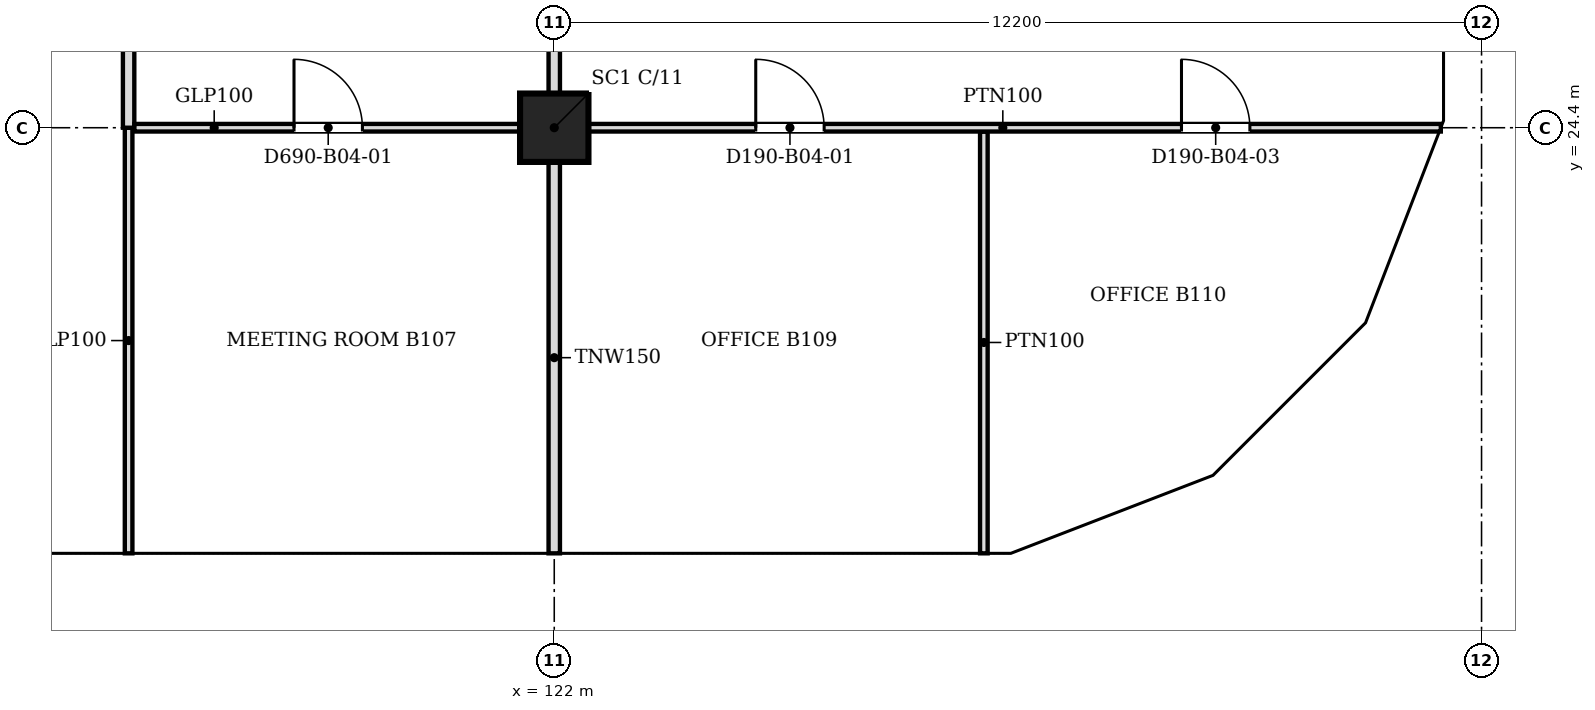
"""IFC4 building model, lengths in metres.
Left out: names, types, materials, properties, quantities, classifications, styles, units other than length and angle.
Written with IfcOpenShell. Run it as: python <this file> out.ifc"""

import sys

from ifc_helpers import new_model, si_unit, direction, frame, frame_2d, origin, origin_2d, place, context, subcontext, project, spatial, polyline, rectangle, outline, extrude, faceted_brep, source, transform, mapped, element, fill, save


model = new_model("IFC4")
c1 = context("Model", 3, precision=1e-05, world=origin(), true_north=direction((0.0, 1.0)))
c2 = subcontext(c1, "Body", "Model", "MODEL_VIEW")
j1 = project(units=[si_unit("LENGTHUNIT", "METRE"), si_unit("PLANEANGLEUNIT", "RADIAN")], contexts=[c1])
p1 = place(None, origin())
s1 = spatial("IfcSite", under=j1, at=p1, CompositionType="ELEMENT")
p2 = place(p1, origin())
s2 = spatial("IfcBuilding", under=s1, at=p2, CompositionType="ELEMENT")
p3 = place(p2, frame((0.0, 0.0, 37.2)))
s3 = spatial("IfcBuildingStorey", under=s2, at=p3, CompositionType="ELEMENT", Elevation=37.2)
p4 = place(p3, frame((122.0, 24.4, 0.0), z_axis=(0.0, 0.0, 1.0), x_axis=(1.0, 0.0, 0.0)))
e1 = element("IfcColumn", 1, at=p4, inside=s3, PredefinedType="COLUMN", context=c2, shape_type="SweptSolid", body=[
    extrude(rectangle(XDim=0.9, YDim=0.9, at=origin_2d()), origin(), (0.0, 0.0, 1.0), 3.6),
])
m1 = source(origin(), c2, "Body", "Brep", [
    faceted_brep([(3.05, -0.25, 0.0), (6.1, -0.25, 3.8), (6.1, -0.25, 3.8), (3.05, -0.25, 7.6), (0.0, -0.25, 3.8), (0.0, 0.25, 3.8), (3.05, 0.25, 7.6), (6.1, 0.25, 3.8), (6.1, 0.25, 3.8), (3.05, 0.25, 0.0)], [[[0, 1, 2, 3, 4]], [[5, 6, 7, 8, 9]], [[9, 8, 1, 0]], [[7, 6, 3, 2]], [[6, 5, 4, 3]], [[5, 9, 0, 4]], [[1, 8, 7, 2]]]),
])
p5 = place(p3, frame((109.8, 18.55, -3.8), z_axis=(0.0, 0.0, 1.0), x_axis=(1.0, 0.0, 0.0)))
e2 = element("IfcWall", 2, at=p5, inside=s3, PredefinedType="SOLIDWALL", context=c2, shape_type="MappedRepresentation", body=[
    mapped(m1, transform((0.0, 0.0, 0.0), scale=1.0)),
])
m2 = source(origin(), c2, "Body", "SweptSolid", [
    extrude(outline(polyline([(3.05, 0.399), (5.78, 3.8), (3.05, 7.201), (0.321, 3.8), (3.05, 0.399)])), frame((0.0, 0.26, 0.0), z_axis=(0.0, -1.0, 0.0), x_axis=(1.0, 0.0, 0.0)), (0.0, 0.0, 1.0), 0.52),
])
p6 = place(p5, origin())
e3 = element("IfcOpeningElement", 3, at=p6, cuts=e2, PredefinedType="OPENING", context=c2, shape_type="MappedRepresentation", body=[
    mapped(m2, transform((0.0, 0.0, 0.0), scale=1.0)),
])
m3 = source(origin(), c2, "Body", "SweptSolid", [
    extrude(outline(polyline([(3.05, 0.0), (6.1, 3.8), (3.05, 7.6), (0.0, 3.8), (3.05, 0.0)])), frame((0.0, 0.25, 0.0), z_axis=(0.0, -1.0, 0.0), x_axis=(1.0, 0.0, 0.0)), (0.0, 0.0, 1.0), 0.5),
])
p7 = place(p3, frame((115.9, 18.55, -3.8), z_axis=(0.0, 0.0, 1.0), x_axis=(1.0, 0.0, 0.0)))
e4 = element("IfcWall", 4, at=p7, inside=s3, PredefinedType="SOLIDWALL", context=c2, shape_type="MappedRepresentation", body=[
    mapped(m3, transform((0.0, 0.0, 0.0), scale=1.0)),
])
p8 = place(p7, origin())
e5 = element("IfcOpeningElement", 5, at=p8, cuts=e4, PredefinedType="OPENING", context=c2, shape_type="MappedRepresentation", body=[
    mapped(m2, transform((0.0, 0.0, 0.0), scale=1.0)),
])
m4 = source(origin(), c2, "Body", "Brep", [
    faceted_brep([(3.05, -0.25, 0.0), (6.053, -0.25, 3.8), (3.05, -0.25, 7.6), (0.0, -0.25, 3.8), (0.0, 0.25, 3.8), (3.05, 0.25, 7.6), (6.007, 0.25, 3.859), (6.007, 0.25, 3.741), (3.05, 0.25, 0.0), (6.053, 0.0, 3.8)], [[[0, 1, 2, 3]], [[4, 5, 6, 7, 8]], [[8, 7, 9, 1, 0]], [[6, 5, 2, 1, 9]], [[5, 4, 3, 2]], [[4, 8, 0, 3]], [[9, 7, 6]]]),
])
p9 = place(p3, frame((122.0, 18.55, -3.8), z_axis=(0.0, 0.0, 1.0), x_axis=(1.0, 0.0, 0.0)))
e6 = element("IfcWall", 6, at=p9, inside=s3, PredefinedType="SOLIDWALL", context=c2, shape_type="MappedRepresentation", body=[
    mapped(m4, transform((0.0, 0.0, 0.0), scale=1.0)),
])
m5 = source(origin(), c2, "Body", "SweptSolid", [
    extrude(outline(polyline([(3.049, 0.401), (5.735, 3.8), (3.049, 7.199), (0.321, 3.8), (3.049, 0.401)])), frame((0.0, 0.26, 0.0), z_axis=(0.0, -1.0, 0.0), x_axis=(1.0, 0.0, 0.0)), (0.0, 0.0, 1.0), 0.52),
])
p10 = place(p9, origin())
e7 = element("IfcOpeningElement", 7, at=p10, cuts=e6, PredefinedType="OPENING", context=c2, shape_type="MappedRepresentation", body=[
    mapped(m5, transform((0.0, 0.0, 0.0), scale=1.0)),
])
m6 = source(origin(), c2, "Body", "Brep", [
    faceted_brep([(2.95, -0.25, 0.0), (3.003, -0.25, 0.068), (3.003, -0.25, 7.532), (2.95, -0.25, 7.6), (0.0, -0.25, 3.8), (0.047, 0.25, 3.86), (2.898, 0.25, 7.532), (2.898, 0.25, 0.068), (0.047, 0.25, 3.74), (2.95, 0.0, 0.0), (2.95, 0.0, 7.6), (0.0, 0.0, 3.8)], [[[0, 1, 2, 3, 4]], [[5, 6, 7, 8]], [[1, 0, 9]], [[10, 3, 2]], [[6, 5, 11, 4, 3, 10]], [[8, 7, 9, 0, 4, 11]], [[8, 11, 5]], [[1, 9, 7, 6, 10, 2]]]),
])
p11 = place(p3, frame((128.053, 18.55, -3.8), z_axis=(0.0, 0.0, 1.0), x_axis=(0.933007896601, 0.359855894603, 0.0)))
e8 = element("IfcWall", 8, at=p11, inside=s3, PredefinedType="SOLIDWALL", context=c2, shape_type="MappedRepresentation", body=[
    mapped(m6, transform((0.0, 0.0, 0.0), scale=1.0)),
])
m7 = source(origin(), c2, "Body", "SweptSolid", [
    extrude(outline(polyline([(2.75, 6.935), (0.316, 3.8), (2.75, 0.665), (2.75, 6.935)])), frame((0.0, 0.26, 0.0), z_axis=(0.0, -1.0, 0.0), x_axis=(1.0, 0.0, 0.0)), (0.0, 0.0, 1.0), 0.52),
])
p12 = place(p11, origin())
e9 = element("IfcOpeningElement", 9, at=p12, cuts=e8, PredefinedType="OPENING", context=c2, shape_type="MappedRepresentation", body=[
    mapped(m7, transform((0.0, 0.0, 0.0), scale=1.0)),
])
m8 = source(origin(), c2, "Body", "Brep", [
    faceted_brep([(0.053, -0.25, 0.0), (2.997, -0.25, 3.8), (0.053, -0.25, 7.6), (0.0, -0.25, 7.532), (0.0, -0.25, 0.068), (0.106, 0.25, 7.532), (2.944, 0.25, 3.868), (2.944, 0.25, 3.732), (0.106, 0.25, 0.068), (2.997, 0.0, 3.8), (0.053, 0.0, 0.0), (0.053, 0.0, 7.6)], [[[0, 1, 2, 3, 4]], [[5, 6, 7, 8]], [[8, 7, 9, 1, 0, 10]], [[6, 5, 11, 2, 1, 9]], [[3, 2, 11]], [[10, 0, 4]], [[8, 10, 4, 3, 11, 5]], [[9, 7, 6]]]),
])
p13 = place(p3, frame((130.769, 19.574, -3.8), z_axis=(0.0, 0.0, 1.0), x_axis=(0.707106781187, 0.707106781187, 0.0)))
e10 = element("IfcWall", 10, at=p13, inside=s3, PredefinedType="SOLIDWALL", context=c2, shape_type="MappedRepresentation", body=[
    mapped(m8, transform((0.0, 0.0, 0.0), scale=1.0)),
])
m9 = source(origin(), c2, "Body", "SweptSolid", [
    extrude(outline(polyline([(0.253, 0.667), (2.681, 3.8), (0.253, 6.934), (0.253, 0.667)])), frame((0.0, 0.26, 0.0), z_axis=(0.0, -1.0, 0.0), x_axis=(1.0, 0.0, 0.0)), (0.0, 0.0, 1.0), 0.52),
])
p14 = place(p13, origin())
e11 = element("IfcOpeningElement", 11, at=p14, cuts=e10, PredefinedType="OPENING", context=c2, shape_type="MappedRepresentation", body=[
    mapped(m9, transform((0.0, 0.0, 0.0), scale=1.0)),
])
m10 = source(origin(), c2, "Body", "Brep", [
    faceted_brep([(2.95, -0.25, 0.0), (2.997, -0.25, 0.059), (2.997, -0.25, 7.541), (2.95, -0.25, 7.6), (0.0, -0.25, 3.8), (0.053, 0.25, 3.868), (2.904, 0.25, 7.54), (2.904, 0.25, 0.06), (0.053, 0.25, 3.732), (2.95, 0.0, 0.0), (2.95, 0.0, 7.6), (0.0, 0.0, 3.8)], [[[0, 1, 2, 3, 4]], [[5, 6, 7, 8]], [[1, 0, 9]], [[10, 3, 2]], [[6, 5, 11, 4, 3, 10]], [[8, 7, 9, 0, 4, 11]], [[8, 11, 5]], [[1, 9, 7, 6, 10, 2]]]),
])
p15 = place(p3, frame((132.888, 21.694, -3.8), z_axis=(0.0, 0.0, 1.0), x_axis=(0.359901446078, 0.932990326376, 0.0)))
e12 = element("IfcWall", 12, at=p15, inside=s3, PredefinedType="SOLIDWALL", context=c2, shape_type="MappedRepresentation", body=[
    mapped(m10, transform((0.0, 0.0, 0.0), scale=1.0)),
])
p16 = place(p15, origin())
e13 = element("IfcOpeningElement", 13, at=p16, cuts=e12, PredefinedType="OPENING", context=c2, shape_type="MappedRepresentation", body=[
    mapped(m7, transform((0.0, 0.0, 0.0), scale=1.0)),
])
m11 = source(origin(), c2, "Body", "Brep", [
    faceted_brep([(0.047, -0.25, 0.0), (3.05, -0.25, 3.8), (0.047, -0.25, 7.6), (0.0, -0.25, 7.54), (0.0, -0.25, 0.06), (0.093, 0.25, 7.541), (3.05, 0.25, 3.8), (0.093, 0.25, 0.059), (0.047, 0.0, 0.0), (0.047, 0.0, 7.6)], [[[0, 1, 2, 3, 4]], [[5, 6, 7]], [[7, 6, 1, 0, 8]], [[6, 5, 9, 2, 1]], [[3, 2, 9]], [[8, 0, 4]], [[7, 8, 4, 3, 9, 5]]]),
])
p17 = place(p3, frame((133.95, 24.4, -3.8), z_axis=(0.0, 0.0, 1.0), x_axis=(0.0, 1.0, 0.0)))
e14 = element("IfcWall", 14, at=p17, inside=s3, PredefinedType="SOLIDWALL", context=c2, shape_type="MappedRepresentation", body=[
    mapped(m11, transform((0.0, 0.0, 0.0), scale=1.0)),
])
m12 = source(origin(), c2, "Body", "SweptSolid", [
    extrude(outline(polyline([(0.247, 0.656), (2.731, 3.8), (0.247, 6.944), (0.247, 0.656)])), frame((0.0, 0.26, 0.0), z_axis=(0.0, -1.0, 0.0), x_axis=(1.0, 0.0, 0.0)), (0.0, 0.0, 1.0), 0.52),
])
p18 = place(p17, origin())
e15 = element("IfcOpeningElement", 15, at=p18, cuts=e14, PredefinedType="OPENING", context=c2, shape_type="MappedRepresentation", body=[
    mapped(m12, transform((0.0, 0.0, 0.0), scale=1.0)),
])
p19 = place(p2, frame((0.0, 0.0, 41.0)))
s4 = spatial("IfcBuildingStorey", under=s2, at=p19, CompositionType="ELEMENT", Elevation=41.0)
p20 = place(p19, frame((112.85, 18.55, -3.8), z_axis=(0.0, 0.0, 1.0), x_axis=(1.0, 0.0, 0.0)))
e16 = element("IfcWall", 16, at=p20, inside=s4, PredefinedType="SOLIDWALL", context=c2, shape_type="MappedRepresentation", body=[
    mapped(m1, transform((0.0, 0.0, 0.0), scale=1.0)),
])
p21 = place(p20, origin())
e17 = element("IfcOpeningElement", 17, at=p21, cuts=e16, PredefinedType="OPENING", context=c2, shape_type="MappedRepresentation", body=[
    mapped(m2, transform((0.0, 0.0, 0.0), scale=1.0)),
])
p22 = place(p19, frame((118.95, 18.55, -3.8), z_axis=(0.0, 0.0, 1.0), x_axis=(1.0, 0.0, 0.0)))
e18 = element("IfcWall", 18, at=p22, inside=s4, PredefinedType="SOLIDWALL", context=c2, shape_type="MappedRepresentation", body=[
    mapped(m3, transform((0.0, 0.0, 0.0), scale=1.0)),
])
p23 = place(p22, origin())
e19 = element("IfcOpeningElement", 19, at=p23, cuts=e18, PredefinedType="OPENING", context=c2, shape_type="MappedRepresentation", body=[
    mapped(m2, transform((0.0, 0.0, 0.0), scale=1.0)),
])
m13 = source(origin(), c2, "Body", "Brep", [
    faceted_brep([(3.003, -0.25, 0.0), (3.05, -0.25, 0.06), (3.05, -0.25, 7.54), (3.003, -0.25, 7.6), (0.0, -0.25, 3.8), (0.0, 0.25, 3.8), (2.957, 0.25, 7.541), (2.957, 0.25, 0.059), (3.003, 0.0, 0.0), (3.003, 0.0, 7.6)], [[[0, 1, 2, 3, 4]], [[5, 6, 7]], [[1, 0, 8]], [[9, 3, 2]], [[6, 5, 4, 3, 9]], [[5, 7, 8, 0, 4]], [[1, 8, 7, 6, 9, 2]]]),
])
p24 = place(p19, frame((125.05, 18.55, -3.8), z_axis=(0.0, 0.0, 1.0), x_axis=(1.0, 0.0, 0.0)))
e20 = element("IfcWall", 20, at=p24, inside=s4, PredefinedType="SOLIDWALL", context=c2, shape_type="MappedRepresentation", body=[
    mapped(m13, transform((0.0, 0.0, 0.0), scale=1.0)),
])
m14 = source(origin(), c2, "Body", "SweptSolid", [
    extrude(outline(polyline([(2.803, 6.944), (0.319, 3.8), (2.803, 0.656), (2.803, 6.944)])), frame((0.0, 0.26, 0.0), z_axis=(0.0, -1.0, 0.0), x_axis=(1.0, 0.0, 0.0)), (0.0, 0.0, 1.0), 0.52),
])
p25 = place(p24, origin())
e21 = element("IfcOpeningElement", 21, at=p25, cuts=e20, PredefinedType="OPENING", context=c2, shape_type="MappedRepresentation", body=[
    mapped(m14, transform((0.0, 0.0, 0.0), scale=1.0)),
])
m15 = source(origin(), c2, "Body", "Brep", [
    faceted_brep([(0.047, -0.25, 0.0), (2.997, -0.25, 3.8), (0.047, -0.25, 7.6), (0.0, -0.25, 7.541), (0.0, -0.25, 0.059), (0.093, 0.25, 7.54), (2.944, 0.25, 3.868), (2.944, 0.25, 3.732), (0.093, 0.25, 0.06), (2.997, 0.0, 3.8), (0.047, 0.0, 0.0), (0.047, 0.0, 7.6)], [[[0, 1, 2, 3, 4]], [[5, 6, 7, 8]], [[8, 7, 9, 1, 0, 10]], [[6, 5, 11, 2, 1, 9]], [[3, 2, 11]], [[10, 0, 4]], [[8, 10, 4, 3, 11, 5]], [[9, 7, 6]]]),
])
p26 = place(p19, frame((128.01, 18.533, -3.8), z_axis=(0.0, 0.0, 1.0), x_axis=(0.932990326376, 0.359901446078, 0.0)))
e22 = element("IfcWall", 22, at=p26, inside=s4, PredefinedType="SOLIDWALL", context=c2, shape_type="MappedRepresentation", body=[
    mapped(m15, transform((0.0, 0.0, 0.0), scale=1.0)),
])
m16 = source(origin(), c2, "Body", "SweptSolid", [
    extrude(outline(polyline([(0.247, 0.665), (2.681, 3.8), (0.247, 6.935), (0.247, 0.665)])), frame((0.0, 0.26, 0.0), z_axis=(0.0, -1.0, 0.0), x_axis=(1.0, 0.0, 0.0)), (0.0, 0.0, 1.0), 0.52),
])
p27 = place(p26, origin())
e23 = element("IfcOpeningElement", 23, at=p27, cuts=e22, PredefinedType="OPENING", context=c2, shape_type="MappedRepresentation", body=[
    mapped(m16, transform((0.0, 0.0, 0.0), scale=1.0)),
])
m17 = source(origin(), c2, "Body", "Brep", [
    faceted_brep([(2.944, -0.25, 0.0), (2.997, -0.25, 0.068), (2.997, -0.25, 7.532), (2.944, -0.25, 7.6), (0.0, -0.25, 3.8), (0.053, 0.25, 3.868), (2.891, 0.25, 7.532), (2.891, 0.25, 0.068), (0.053, 0.25, 3.732), (2.944, 0.0, 0.0), (2.944, 0.0, 7.6), (0.0, 0.0, 3.8)], [[[0, 1, 2, 3, 4]], [[5, 6, 7, 8]], [[1, 0, 9]], [[10, 3, 2]], [[6, 5, 11, 4, 3, 10]], [[8, 7, 9, 0, 4, 11]], [[8, 11, 5]], [[1, 9, 7, 6, 10, 2]]]),
])
p28 = place(p19, frame((130.806, 19.612, -3.8), z_axis=(0.0, 0.0, 1.0), x_axis=(0.707106781187, 0.707106781187, 0.0)))
e24 = element("IfcWall", 24, at=p28, inside=s4, PredefinedType="SOLIDWALL", context=c2, shape_type="MappedRepresentation", body=[
    mapped(m17, transform((0.0, 0.0, 0.0), scale=1.0)),
])
m18 = source(origin(), c2, "Body", "SweptSolid", [
    extrude(outline(polyline([(2.744, 6.934), (0.316, 3.8), (2.744, 0.666), (2.744, 6.934)])), frame((0.0, 0.26, 0.0), z_axis=(0.0, -1.0, 0.0), x_axis=(1.0, 0.0, 0.0)), (0.0, 0.0, 1.0), 0.52),
])
p29 = place(p28, origin())
e25 = element("IfcOpeningElement", 25, at=p29, cuts=e24, PredefinedType="OPENING", context=c2, shape_type="MappedRepresentation", body=[
    mapped(m18, transform((0.0, 0.0, 0.0), scale=1.0)),
])
m19 = source(origin(), c2, "Body", "Brep", [
    faceted_brep([(0.053, -0.25, 0.0), (3.003, -0.25, 3.8), (0.053, -0.25, 7.6), (0.0, -0.25, 7.532), (0.0, -0.25, 0.068), (0.106, 0.25, 7.532), (2.957, 0.25, 3.86), (2.957, 0.25, 3.74), (0.106, 0.25, 0.068), (3.003, 0.0, 3.8), (0.053, 0.0, 0.0), (0.053, 0.0, 7.6)], [[[0, 1, 2, 3, 4]], [[5, 6, 7, 8]], [[8, 7, 9, 1, 0, 10]], [[6, 5, 11, 2, 1, 9]], [[3, 2, 11]], [[10, 0, 4]], [[8, 10, 4, 3, 11, 5]], [[9, 7, 6]]]),
])
p30 = place(p19, frame((132.869, 21.644, -3.8), z_axis=(0.0, 0.0, 1.0), x_axis=(0.359855894603, 0.933007896601, 0.0)))
e26 = element("IfcWall", 26, at=p30, inside=s4, PredefinedType="SOLIDWALL", context=c2, shape_type="MappedRepresentation", body=[
    mapped(m19, transform((0.0, 0.0, 0.0), scale=1.0)),
])
m20 = source(origin(), c2, "Body", "SweptSolid", [
    extrude(outline(polyline([(0.253, 0.665), (2.687, 3.8), (0.253, 6.935), (0.253, 0.665)])), frame((0.0, 0.26, 0.0), z_axis=(0.0, -1.0, 0.0), x_axis=(1.0, 0.0, 0.0)), (0.0, 0.0, 1.0), 0.52),
])
p31 = place(p30, origin())
e27 = element("IfcOpeningElement", 27, at=p31, cuts=e26, PredefinedType="OPENING", context=c2, shape_type="MappedRepresentation", body=[
    mapped(m20, transform((0.0, 0.0, 0.0), scale=1.0)),
])
m21 = source(origin(), c2, "Body", "Brep", [
    faceted_brep([(3.003, -0.25, 0.0), (6.053, -0.25, 3.8), (3.003, -0.25, 7.6), (0.0, -0.25, 3.8), (0.047, 0.25, 3.859), (3.003, 0.25, 7.6), (6.053, 0.25, 3.8), (3.003, 0.25, 0.0), (0.047, 0.25, 3.741), (0.0, 0.0, 3.8)], [[[0, 1, 2, 3]], [[4, 5, 6, 7, 8]], [[7, 6, 1, 0]], [[6, 5, 2, 1]], [[5, 4, 9, 3, 2]], [[8, 7, 0, 3, 9]], [[8, 9, 4]]]),
])
p32 = place(p19, frame((133.95, 24.447, -3.8), z_axis=(0.0, 0.0, 1.0), x_axis=(0.0, 1.0, 0.0)))
e28 = element("IfcWall", 28, at=p32, inside=s4, PredefinedType="SOLIDWALL", context=c2, shape_type="MappedRepresentation", body=[
    mapped(m21, transform((0.0, 0.0, 0.0), scale=1.0)),
])
m22 = source(origin(), c2, "Body", "SweptSolid", [
    extrude(outline(polyline([(3.005, 0.401), (5.733, 3.8), (3.005, 7.199), (0.319, 3.8), (3.005, 0.401)])), frame((0.0, 0.26, 0.0), z_axis=(0.0, -1.0, 0.0), x_axis=(1.0, 0.0, 0.0)), (0.0, 0.0, 1.0), 0.52),
])
p33 = place(p32, origin())
e29 = element("IfcOpeningElement", 29, at=p33, cuts=e28, PredefinedType="OPENING", context=c2, shape_type="MappedRepresentation", body=[
    mapped(m22, transform((0.0, 0.0, 0.0), scale=1.0)),
])
p34 = place(p3, frame((116.4, 18.8, 0.0), z_axis=(0.0, 0.0, 1.0), x_axis=(0.0, 1.0, 0.0)))
e30 = element("IfcWall", 30, at=p34, inside=s3, PredefinedType="PARTITIONING", context=c2, shape_type="SweptSolid", body=[
    extrude(rectangle(XDim=5.599, YDim=0.1, at=frame_2d((2.799, 0.0))), origin(), (0.0, 0.0, 1.0), 3.067),
])
p35 = place(p3, frame((122.0, 18.8, 0.0), z_axis=(0.0, 0.0, 1.0), x_axis=(0.0, 1.0, 0.0)))
e31 = element("IfcWall", 31, at=p35, inside=s3, PredefinedType="PARTITIONING", context=c2, shape_type="SweptSolid", body=[
    extrude(rectangle(XDim=5.149, YDim=0.15, at=frame_2d((2.574, 0.0))), origin(), (0.0, 0.0, 1.0), 3.067),
])
p36 = place(p3, frame((127.652, 18.8, 0.0), z_axis=(0.0, 0.0, 1.0), x_axis=(0.0, 1.0, 0.0)))
e32 = element("IfcWall", 32, at=p36, inside=s3, PredefinedType="PARTITIONING", context=c2, shape_type="SweptSolid", body=[
    extrude(rectangle(XDim=5.549, YDim=0.1, at=frame_2d((2.774, 0.0))), origin(), (0.0, 0.0, 1.0), 3.067),
])
p37 = place(p3, frame((116.4, 24.4, 0.0), z_axis=(0.0, 0.0, 1.0), x_axis=(0.0, 1.0, 0.0)))
e33 = element("IfcWall", 33, at=p37, inside=s3, PredefinedType="PARTITIONING", context=c2, shape_type="SweptSolid", body=[
    extrude(rectangle(XDim=8.924, YDim=0.15, at=frame_2d((4.462, 0.0))), origin(), (0.0, 0.0, 1.0), 3.067),
])
p38 = place(p3, frame((121.549, 24.4, 0.0), z_axis=(0.0, 0.0, 1.0), x_axis=(-1.0, 0.0, 0.0)))
e34 = element("IfcWall", 34, at=p38, inside=s3, PredefinedType="PARTITIONING", context=c2, shape_type="SweptSolid", body=[
    extrude(rectangle(XDim=5.073, YDim=0.1, at=frame_2d((2.537, 0.0))), origin(), (0.0, 0.0, 1.0), 3.067),
])
m23 = source(origin(), c2, "Body", "SweptSolid", [
    extrude(rectangle(XDim=0.9, YDim=2.1, at=frame_2d((0.45, 1.05))), frame((0.0, 0.06, 0.0), z_axis=(0.0, -1.0, 0.0), x_axis=(1.0, 0.0, 0.0)), (0.0, 0.0, 1.0), 0.12),
])
p39 = place(p38, frame((2.073, 0.0, 0.0)))
e35 = element("IfcOpeningElement", 35, at=p39, cuts=e34, PredefinedType="OPENING", context=c2, shape_type="MappedRepresentation", body=[
    mapped(m23, transform((0.0, 0.0, 0.0), scale=1.0)),
])
p40 = place(p3, frame((133.664, 24.4, 0.0), z_axis=(0.0, 0.0, 1.0), x_axis=(-1.0, 0.0, 0.0)))
e36 = element("IfcWall", 36, at=p40, inside=s3, PredefinedType="PARTITIONING", context=c2, shape_type="SweptSolid", body=[
    extrude(rectangle(XDim=11.213, YDim=0.1, at=frame_2d((5.606, 0.0))), origin(), (0.0, 0.0, 1.0), 3.067),
])
p41 = place(p40, frame((8.113, 0.0, 0.0)))
e37 = element("IfcOpeningElement", 37, at=p41, cuts=e36, PredefinedType="OPENING", context=c2, shape_type="MappedRepresentation", body=[
    mapped(m23, transform((0.0, 0.0, 0.0), scale=1.0)),
])
p42 = place(p40, frame((2.512, 0.0, 0.0)))
e38 = element("IfcOpeningElement", 38, at=p42, cuts=e36, PredefinedType="OPENING", context=c2, shape_type="MappedRepresentation", body=[
    mapped(m23, transform((0.0, 0.0, 0.0), scale=1.0)),
])
p43 = place(p3, frame((122.0, 24.851, 0.0), z_axis=(0.0, 0.0, 1.0), x_axis=(0.0, 1.0, 0.0)))
e39 = element("IfcWall", 39, at=p43, inside=s3, PredefinedType="PARTITIONING", context=c2, shape_type="SweptSolid", body=[
    extrude(rectangle(XDim=8.473, YDim=0.15, at=frame_2d((4.236, 0.0))), origin(), (0.0, 0.0, 1.0), 3.067),
])
m24 = source(origin(), c2, "Body", "SweptSolid", [
    extrude(rectangle(XDim=0.9, YDim=2.1, at=frame_2d((0.45, 1.05))), frame((0.0, 0.025, 0.0), z_axis=(0.0, -1.0, 0.0), x_axis=(1.0, 0.0, 0.0)), (0.0, 0.0, 1.0), 0.05),
])
p44 = place(p39, origin())
e40 = element("IfcDoor", 40, at=p44, inside=s3, OperationType="SINGLE_SWING_RIGHT", PredefinedType="DOOR", context=c2, shape_type="MappedRepresentation", body=[
    mapped(m24, transform((0.0, 0.0, 0.0), scale=1.0)),
])
fill(e35, e40)
p45 = place(p41, origin())
e41 = element("IfcDoor", 41, at=p45, inside=s3, OperationType="SINGLE_SWING_RIGHT", PredefinedType="DOOR", context=c2, shape_type="MappedRepresentation", body=[
    mapped(m24, transform((0.0, 0.0, 0.0), scale=1.0)),
])
fill(e37, e41)
p46 = place(p42, origin())
e42 = element("IfcDoor", 42, at=p46, inside=s3, OperationType="SINGLE_SWING_RIGHT", PredefinedType="DOOR", context=c2, shape_type="MappedRepresentation", body=[
    mapped(m24, transform((0.0, 0.0, 0.0), scale=1.0)),
])
fill(e38, e42)
save(model, sys.argv[1])
